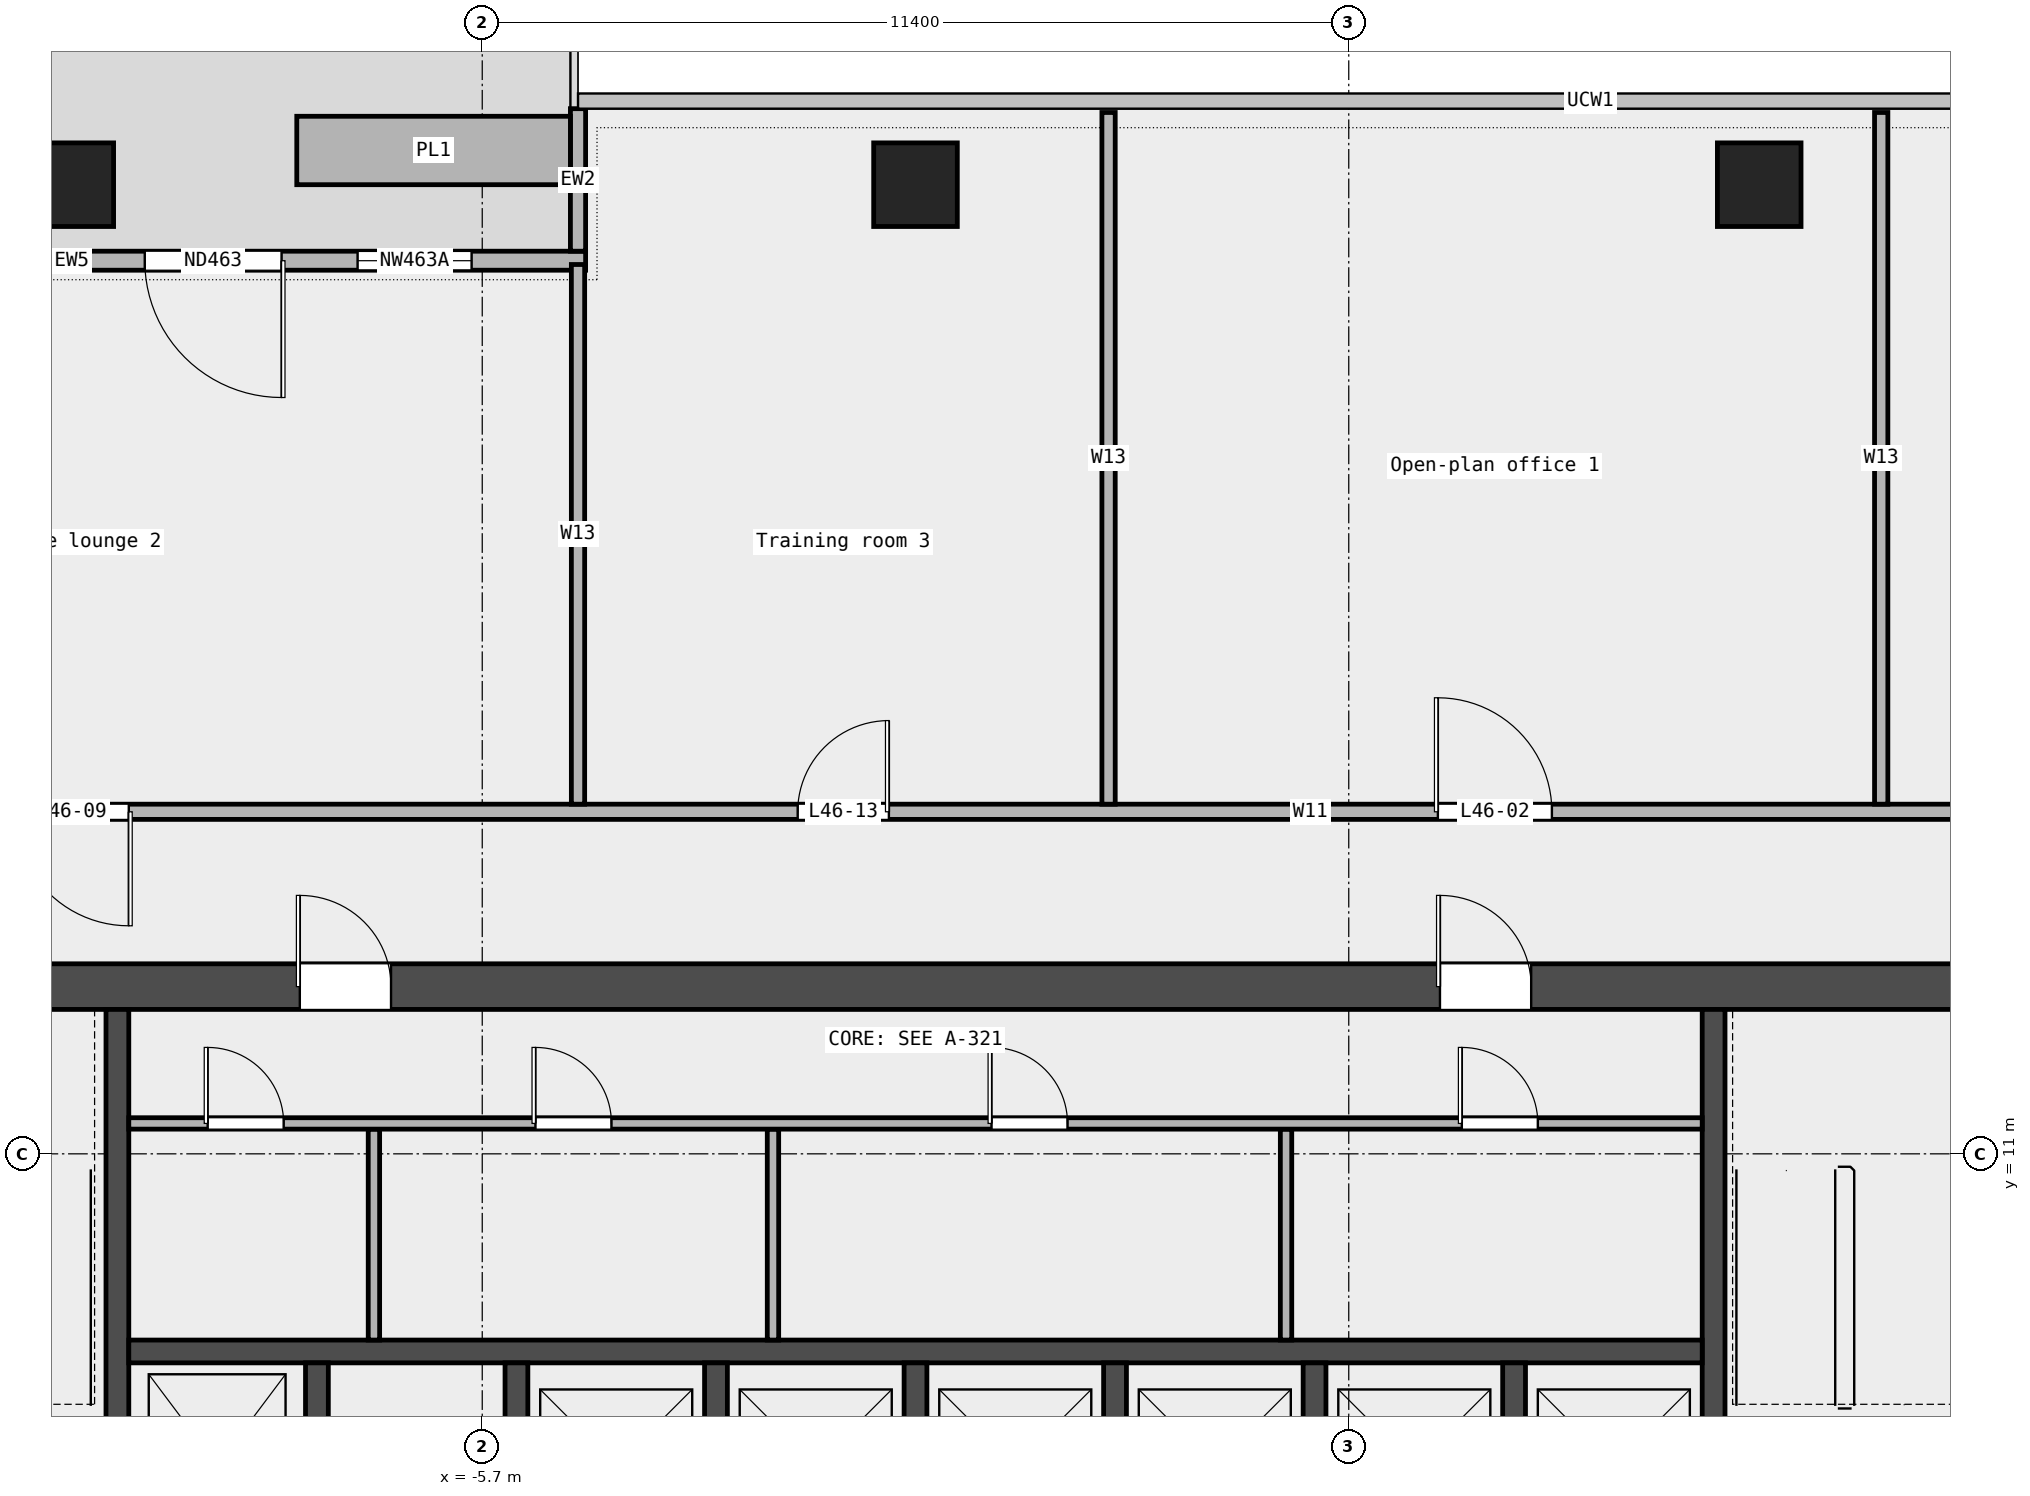
"""IFC4 building model, lengths in metres.
Left out: names, types, materials, properties, quantities, classifications, styles, units other than length and angle.
Written with IfcOpenShell. Run it as: python <this file> out.ifc"""

import sys

from ifc_helpers import new_model, si_unit, direction, frame, frame_2d, origin, origin_2d, place, context, subcontext, project, spatial, rectangle, extrude, element, fill, save


model = new_model("IFC4")
c1 = context("Model", 3, precision=1e-05, world=origin(), true_north=direction((0.0, 1.0)))
c2 = subcontext(c1, "Body", "Model", "MODEL_VIEW")
j1 = project(units=[si_unit("LENGTHUNIT", "METRE"), si_unit("PLANEANGLEUNIT", "RADIAN")], contexts=[c1])
p1 = place(None, origin())
s1 = spatial("IfcSite", under=j1, at=p1, CompositionType="ELEMENT")
p2 = place(p1, origin())
s2 = spatial("IfcBuilding", under=s1, at=p2, CompositionType="ELEMENT")
p3 = place(p2, frame((0.0, 0.0, 219.0)))
s3 = spatial("IfcBuildingStorey", under=s2, at=p3, CompositionType="ELEMENT", Elevation=219.0)
for number, where, z_axis, x_axis in (
    (1, (11.1, 23.75, 0.0), (0.0, 0.0, 1.0), (1.0, 0.0, 0.0)),
    (2, (0.0, 23.75, 0.0), (0.0, 0.0, 1.0), (1.0, 0.0, 0.0)),
    (3, (-11.1, 23.75, 0.0), (0.0, 0.0, 1.0), (1.0, 0.0, 0.0)),
):
    element("IfcColumn", number, at=place(p3, frame(where, z_axis=z_axis, x_axis=x_axis)), inside=s3, PredefinedType="COLUMN", context=c2, shape_type="SweptSolid", body=[
        extrude(rectangle(XDim=1.1, YDim=1.1, at=origin_2d()), origin(), (0.0, 0.0, 1.0), 3.6),
    ])
p4 = place(p3, frame((-4.34, 22.75, 0.0), z_axis=(0.0, 0.0, 1.0), x_axis=(-1.0, 0.0, 0.0)))
e4 = element("IfcWall", 4, at=p4, inside=s3, PredefinedType="STANDARD", context=c2, shape_type="SweptSolid", body=[
    extrude(rectangle(XDim=13.52, YDim=0.25, at=frame_2d((6.76, 0.0))), origin(), (0.0, 0.0, 1.0), 3.6),
])
p5 = place(p4, frame((1.5, 0.0, 0.45)))
e5 = element("IfcOpeningElement", 5, at=p5, cuts=e4, PredefinedType="OPENING", context=c2, shape_type="SweptSolid", body=[
    extrude(rectangle(XDim=1.5, YDim=2.4, at=frame_2d((0.75, 1.2))), frame((0.0, 0.137, 0.0), z_axis=(0.0, -1.0, 0.0), x_axis=(1.0, 0.0, 0.0)), (0.0, 0.0, 1.0), 0.274),
])
p6 = place(p4, frame((4.0, 0.0, 0.0)))
e6 = element("IfcOpeningElement", 6, at=p6, cuts=e4, PredefinedType="OPENING", context=c2, shape_type="SweptSolid", body=[
    extrude(rectangle(XDim=1.8, YDim=2.4, at=frame_2d((0.9, 1.2))), frame((0.0, 0.137, 0.0), z_axis=(0.0, -1.0, 0.0), x_axis=(1.0, 0.0, 0.0)), (0.0, 0.0, 1.0), 0.274),
])
p7 = place(p4, frame((10.5, 0.0, 0.45)))
e7 = element("IfcOpeningElement", 7, at=p7, cuts=e4, PredefinedType="OPENING", context=c2, shape_type="SweptSolid", body=[
    extrude(rectangle(XDim=1.5, YDim=2.4, at=frame_2d((0.75, 1.2))), frame((0.0, 0.137, 0.0), z_axis=(0.0, -1.0, 0.0), x_axis=(1.0, 0.0, 0.0)), (0.0, 0.0, 1.0), 0.274),
])
p8 = place(p3, frame((-4.44, 24.75, 0.0), z_axis=(0.0, 0.0, 1.0), x_axis=(0.0, -1.0, 0.0)))
e8 = element("IfcWall", 8, at=p8, inside=s3, PredefinedType="STANDARD", context=c2, shape_type="SweptSolid", body=[
    extrude(rectangle(XDim=1.875, YDim=0.2, at=frame_2d((0.938, 0.0))), origin(), (0.0, 0.0, 1.0), 3.6),
])
p9 = place(p3, frame((-4.54, 24.2, 0.0), z_axis=(0.0, 0.0, 1.0), x_axis=(-1.0, 0.0, 0.0)))
e9 = element("IfcWall", 9, at=p9, inside=s3, PredefinedType="STANDARD", context=c2, shape_type="SweptSolid", body=[
    extrude(rectangle(XDim=3.6, YDim=0.9, at=frame_2d((1.8, 0.0))), origin(), (0.0, 0.0, 1.0), 0.7),
])
p10 = place(p3, frame((-17.76, 15.5, 0.0), z_axis=(0.0, 0.0, 1.0), x_axis=(1.0, 0.0, 0.0)))
e10 = element("IfcWall", 10, at=p10, inside=s3, PredefinedType="PARTITIONING", context=c2, shape_type="SweptSolid", body=[
    extrude(rectangle(XDim=45.91, YDim=0.2, at=frame_2d((22.955, 0.0))), origin(), (0.0, 0.0, 1.0), 3.6),
])
p11 = place(p10, frame((37.337, 0.0, 0.0)))
e11 = element("IfcOpeningElement", 11, at=p11, cuts=e10, PredefinedType="OPENING", context=c2, shape_type="SweptSolid", body=[
    extrude(rectangle(XDim=1.5, YDim=2.1, at=frame_2d((0.75, 1.05))), frame((0.0, 0.112, 0.0), z_axis=(0.0, -1.0, 0.0), x_axis=(1.0, 0.0, 0.0)), (0.0, 0.0, 1.0), 0.224),
])
p12 = place(p10, frame((24.633, 0.0, 0.0)))
e12 = element("IfcOpeningElement", 12, at=p12, cuts=e10, PredefinedType="OPENING", context=c2, shape_type="SweptSolid", body=[
    extrude(rectangle(XDim=1.5, YDim=2.1, at=frame_2d((0.75, 1.05))), frame((0.0, 0.112, 0.0), z_axis=(0.0, -1.0, 0.0), x_axis=(1.0, 0.0, 0.0)), (0.0, 0.0, 1.0), 0.224),
])
p13 = place(p10, frame((5.91, 0.0, 0.0)))
e13 = element("IfcOpeningElement", 13, at=p13, cuts=e10, PredefinedType="OPENING", context=c2, shape_type="SweptSolid", body=[
    extrude(rectangle(XDim=1.5, YDim=2.1, at=frame_2d((0.75, 1.05))), frame((0.0, 0.112, 0.0), z_axis=(0.0, -1.0, 0.0), x_axis=(1.0, 0.0, 0.0)), (0.0, 0.0, 1.0), 0.224),
])
p14 = place(p10, frame((16.21, 0.0, 0.0)))
e14 = element("IfcOpeningElement", 14, at=p14, cuts=e10, PredefinedType="OPENING", context=c2, shape_type="SweptSolid", body=[
    extrude(rectangle(XDim=1.2, YDim=2.1, at=frame_2d((0.6, 1.05))), frame((0.0, 0.112, 0.0), z_axis=(0.0, -1.0, 0.0), x_axis=(1.0, 0.0, 0.0)), (0.0, 0.0, 1.0), 0.224),
])
p15 = place(p3, frame((-4.44, 15.6, 0.0), z_axis=(0.0, 0.0, 1.0), x_axis=(0.0, 1.0, 0.0)))
e15 = element("IfcWall", 15, at=p15, inside=s3, PredefinedType="PARTITIONING", context=c2, shape_type="SweptSolid", body=[
    extrude(rectangle(XDim=7.1, YDim=0.175, at=frame_2d((3.55, 0.0))), origin(), (0.0, 0.0, 1.0), 3.6),
])
for number, where, z_axis, x_axis in (
    (16, (2.54, 15.6, 0.0), (0.0, 0.0, 1.0), (0.0, 1.0, 0.0)),
    (17, (12.705, 15.6, 0.0), (0.0, 0.0, 1.0), (0.0, 1.0, 0.0)),
):
    element("IfcWall", number, at=place(p3, frame(where, z_axis=z_axis, x_axis=x_axis)), inside=s3, PredefinedType="PARTITIONING", context=c2, shape_type="SweptSolid", body=[
        extrude(rectangle(XDim=9.1, YDim=0.175, at=frame_2d((4.55, 0.0))), origin(), (0.0, 0.0, 1.0), 3.6),
    ])
p16 = place(p3, frame((-14.4, 13.2, 0.0), z_axis=(0.0, 0.0, 1.0), x_axis=(1.0, 0.0, 0.0)))
e18 = element("IfcWall", 18, at=p16, inside=s3, PredefinedType="SHEAR", context=c2, shape_type="SweptSolid", body=[
    extrude(rectangle(XDim=28.8, YDim=0.6, at=frame_2d((14.4, 0.0))), origin(), (0.0, 0.0, 1.0), 3.7),
])
p17 = place(p16, frame((6.3, 0.0, 0.0)))
e19 = element("IfcOpeningElement", 19, at=p17, cuts=e18, PredefinedType="OPENING", context=c2, shape_type="SweptSolid", body=[
    extrude(rectangle(XDim=1.2, YDim=2.1, at=frame_2d((0.6, 1.05))), frame((0.0, 0.312, 0.0), z_axis=(0.0, -1.0, 0.0), x_axis=(1.0, 0.0, 0.0)), (0.0, 0.0, 1.0), 0.624),
])
p18 = place(p16, frame((21.3, 0.0, 0.0)))
e20 = element("IfcOpeningElement", 20, at=p18, cuts=e18, PredefinedType="OPENING", context=c2, shape_type="SweptSolid", body=[
    extrude(rectangle(XDim=1.2, YDim=2.1, at=frame_2d((0.6, 1.05))), frame((0.0, 0.312, 0.0), z_axis=(0.0, -1.0, 0.0), x_axis=(1.0, 0.0, 0.0)), (0.0, 0.0, 1.0), 0.624),
])
for number, where, z_axis, x_axis in (
    (21, (-10.5, 5.25, 0.0), (0.0, 0.0, 1.0), (0.0, 1.0, 0.0)),
    (22, (10.5, 5.25, 0.0), (0.0, 0.0, 1.0), (0.0, 1.0, 0.0)),
):
    element("IfcWall", number, at=place(p3, frame(where, z_axis=z_axis, x_axis=x_axis)), inside=s3, PredefinedType="SHEAR", context=c2, shape_type="SweptSolid", body=[
        extrude(rectangle(XDim=7.65, YDim=0.3, at=frame_2d((3.825, 0.0))), origin(), (0.0, 0.0, 1.0), 3.7),
    ])
p19 = place(p3, frame((-10.35, 8.4, 0.0), z_axis=(0.0, 0.0, 1.0), x_axis=(1.0, 0.0, 0.0)))
e23 = element("IfcWall", 23, at=p19, inside=s3, PredefinedType="SOLIDWALL", context=c2, shape_type="SweptSolid", body=[
    extrude(rectangle(XDim=20.7, YDim=0.3, at=frame_2d((10.35, 0.0))), origin(), (0.0, 0.0, 1.0), 3.7),
])
for number, where, z_axis, x_axis in (
    (24, (-7.875, 5.55, 0.0), (0.0, 0.0, 1.0), (0.0, 1.0, 0.0)),
    (25, (-5.25, 5.55, 0.0), (0.0, 0.0, 1.0), (0.0, 1.0, 0.0)),
    (26, (-2.625, 5.55, 0.0), (0.0, 0.0, 1.0), (0.0, 1.0, 0.0)),
    (27, (0.0, 5.55, 0.0), (0.0, 0.0, 1.0), (0.0, 1.0, 0.0)),
    (28, (2.625, 5.55, 0.0), (0.0, 0.0, 1.0), (0.0, 1.0, 0.0)),
    (29, (5.25, 5.55, 0.0), (0.0, 0.0, 1.0), (0.0, 1.0, 0.0)),
    (30, (7.875, 5.55, 0.0), (0.0, 0.0, 1.0), (0.0, 1.0, 0.0)),
):
    element("IfcWall", number, at=place(p3, frame(where, z_axis=z_axis, x_axis=x_axis)), inside=s3, PredefinedType="SOLIDWALL", context=c2, shape_type="SweptSolid", body=[
        extrude(rectangle(XDim=2.7, YDim=0.3, at=frame_2d((1.35, 0.0))), origin(), (0.0, 0.0, 1.0), 3.7),
    ])
for number, where, z_axis, x_axis in (
    (31, (-7.125, 8.55, 0.0), (0.0, 0.0, 1.0), (0.0, 1.0, 0.0)),
    (32, (-1.875, 8.55, 0.0), (0.0, 0.0, 1.0), (0.0, 1.0, 0.0)),
    (33, (4.875, 8.55, 0.0), (0.0, 0.0, 1.0), (0.0, 1.0, 0.0)),
):
    element("IfcWall", number, at=place(p3, frame(where, z_axis=z_axis, x_axis=x_axis)), inside=s3, PredefinedType="PARTITIONING", context=c2, shape_type="SweptSolid", body=[
        extrude(rectangle(XDim=2.775, YDim=0.15, at=frame_2d((1.387, 0.0))), origin(), (0.0, 0.0, 1.0), 3.7),
    ])
p20 = place(p3, frame((-10.35, 11.4, 0.0), z_axis=(0.0, 0.0, 1.0), x_axis=(1.0, 0.0, 0.0)))
e34 = element("IfcWall", 34, at=p20, inside=s3, PredefinedType="PARTITIONING", context=c2, shape_type="SweptSolid", body=[
    extrude(rectangle(XDim=20.7, YDim=0.15, at=frame_2d((10.35, 0.0))), origin(), (0.0, 0.0, 1.0), 3.7),
])
p21 = place(p20, frame((1.038, 0.0, 0.0)))
e35 = element("IfcOpeningElement", 35, at=p21, cuts=e34, PredefinedType="OPENING", context=c2, shape_type="SweptSolid", body=[
    extrude(rectangle(XDim=1.0, YDim=2.1, at=frame_2d((0.5, 1.05))), frame((0.0, 0.087, 0.0), z_axis=(0.0, -1.0, 0.0), x_axis=(1.0, 0.0, 0.0)), (0.0, 0.0, 1.0), 0.174),
])
p22 = place(p20, frame((5.35, 0.0, 0.0)))
e36 = element("IfcOpeningElement", 36, at=p22, cuts=e34, PredefinedType="OPENING", context=c2, shape_type="SweptSolid", body=[
    extrude(rectangle(XDim=1.0, YDim=2.1, at=frame_2d((0.5, 1.05))), frame((0.0, 0.087, 0.0), z_axis=(0.0, -1.0, 0.0), x_axis=(1.0, 0.0, 0.0)), (0.0, 0.0, 1.0), 0.174),
])
p23 = place(p20, frame((11.35, 0.0, 0.0)))
e37 = element("IfcOpeningElement", 37, at=p23, cuts=e34, PredefinedType="OPENING", context=c2, shape_type="SweptSolid", body=[
    extrude(rectangle(XDim=1.0, YDim=2.1, at=frame_2d((0.5, 1.05))), frame((0.0, 0.087, 0.0), z_axis=(0.0, -1.0, 0.0), x_axis=(1.0, 0.0, 0.0)), (0.0, 0.0, 1.0), 0.174),
])
p24 = place(p20, frame((17.538, 0.0, 0.0)))
e38 = element("IfcOpeningElement", 38, at=p24, cuts=e34, PredefinedType="OPENING", context=c2, shape_type="SweptSolid", body=[
    extrude(rectangle(XDim=1.0, YDim=2.1, at=frame_2d((0.5, 1.05))), frame((0.0, 0.087, 0.0), z_axis=(0.0, -1.0, 0.0), x_axis=(1.0, 0.0, 0.0)), (0.0, 0.0, 1.0), 0.174),
])
p25 = place(p5, origin())
e39 = element("IfcWindow", 39, at=p25, inside=s3, PartitioningType="SINGLE_PANEL", PredefinedType="WINDOW", context=c2, shape_type="SweptSolid", body=[
    extrude(rectangle(XDim=1.5, YDim=2.4, at=frame_2d((0.75, 1.2))), frame((0.0, 0.03, 0.0), z_axis=(0.0, -1.0, 0.0), x_axis=(1.0, 0.0, 0.0)), (0.0, 0.0, 1.0), 0.06),
])
fill(e5, e39)
p26 = place(p6, origin())
e40 = element("IfcDoor", 40, at=p26, inside=s3, OperationType="DOUBLE_DOOR_SINGLE_SWING", PredefinedType="DOOR", context=c2, shape_type="SweptSolid", body=[
    extrude(rectangle(XDim=1.8, YDim=2.4, at=frame_2d((0.9, 1.2))), frame((0.0, 0.025, 0.0), z_axis=(0.0, -1.0, 0.0), x_axis=(1.0, 0.0, 0.0)), (0.0, 0.0, 1.0), 0.05),
])
fill(e6, e40)
p27 = place(p12, origin())
e41 = element("IfcDoor", 41, at=p27, inside=s3, OperationType="DOUBLE_DOOR_SINGLE_SWING", PredefinedType="DOOR", context=c2, shape_type="SweptSolid", body=[
    extrude(rectangle(XDim=1.5, YDim=2.1, at=frame_2d((0.75, 1.05))), frame((0.0, 0.025, 0.0), z_axis=(0.0, -1.0, 0.0), x_axis=(1.0, 0.0, 0.0)), (0.0, 0.0, 1.0), 0.05),
])
fill(e12, e41)
p28 = place(p13, origin())
e42 = element("IfcDoor", 42, at=p28, inside=s3, OperationType="DOUBLE_DOOR_SINGLE_SWING", PredefinedType="DOOR", context=c2, shape_type="SweptSolid", body=[
    extrude(rectangle(XDim=1.5, YDim=2.1, at=frame_2d((0.75, 1.05))), frame((0.0, 0.025, 0.0), z_axis=(0.0, -1.0, 0.0), x_axis=(1.0, 0.0, 0.0)), (0.0, 0.0, 1.0), 0.05),
])
fill(e13, e42)
p29 = place(p14, origin())
e43 = element("IfcDoor", 43, at=p29, inside=s3, OperationType="SINGLE_SWING_RIGHT", PredefinedType="DOOR", context=c2, shape_type="SweptSolid", body=[
    extrude(rectangle(XDim=1.2, YDim=2.1, at=frame_2d((0.6, 1.05))), frame((0.0, 0.025, 0.0), z_axis=(0.0, -1.0, 0.0), x_axis=(1.0, 0.0, 0.0)), (0.0, 0.0, 1.0), 0.05),
])
fill(e14, e43)
p30 = place(p21, origin())
e44 = element("IfcDoor", 44, at=p30, inside=s3, OperationType="SINGLE_SWING_LEFT", PredefinedType="DOOR", context=c2, shape_type="SweptSolid", body=[
    extrude(rectangle(XDim=1.0, YDim=2.1, at=frame_2d((0.5, 1.05))), frame((0.0, 0.025, 0.0), z_axis=(0.0, -1.0, 0.0), x_axis=(1.0, 0.0, 0.0)), (0.0, 0.0, 1.0), 0.05),
])
fill(e35, e44)
p31 = place(p22, origin())
e45 = element("IfcDoor", 45, at=p31, inside=s3, OperationType="SINGLE_SWING_LEFT", PredefinedType="DOOR", context=c2, shape_type="SweptSolid", body=[
    extrude(rectangle(XDim=1.0, YDim=2.1, at=frame_2d((0.5, 1.05))), frame((0.0, 0.025, 0.0), z_axis=(0.0, -1.0, 0.0), x_axis=(1.0, 0.0, 0.0)), (0.0, 0.0, 1.0), 0.05),
])
fill(e36, e45)
p32 = place(p23, origin())
e46 = element("IfcDoor", 46, at=p32, inside=s3, OperationType="SINGLE_SWING_LEFT", PredefinedType="DOOR", context=c2, shape_type="SweptSolid", body=[
    extrude(rectangle(XDim=1.0, YDim=2.1, at=frame_2d((0.5, 1.05))), frame((0.0, 0.025, 0.0), z_axis=(0.0, -1.0, 0.0), x_axis=(1.0, 0.0, 0.0)), (0.0, 0.0, 1.0), 0.05),
])
fill(e37, e46)
p33 = place(p24, origin())
e47 = element("IfcDoor", 47, at=p33, inside=s3, OperationType="SINGLE_SWING_LEFT", PredefinedType="DOOR", context=c2, shape_type="SweptSolid", body=[
    extrude(rectangle(XDim=1.0, YDim=2.1, at=frame_2d((0.5, 1.05))), frame((0.0, 0.025, 0.0), z_axis=(0.0, -1.0, 0.0), x_axis=(1.0, 0.0, 0.0)), (0.0, 0.0, 1.0), 0.05),
])
fill(e38, e47)
p34 = place(p17, origin())
e48 = element("IfcDoor", 48, at=p34, inside=s3, OperationType="SINGLE_SWING_LEFT", PredefinedType="DOOR", context=c2, shape_type="SweptSolid", body=[
    extrude(rectangle(XDim=1.2, YDim=2.1, at=frame_2d((0.6, 1.05))), frame((0.0, 0.025, 0.0), z_axis=(0.0, -1.0, 0.0), x_axis=(1.0, 0.0, 0.0)), (0.0, 0.0, 1.0), 0.05),
])
fill(e19, e48)
p35 = place(p18, origin())
e49 = element("IfcDoor", 49, at=p35, inside=s3, OperationType="SINGLE_SWING_RIGHT", PredefinedType="DOOR", context=c2, shape_type="SweptSolid", body=[
    extrude(rectangle(XDim=1.2, YDim=2.1, at=frame_2d((0.6, 1.05))), frame((0.0, 0.025, 0.0), z_axis=(0.0, -1.0, 0.0), x_axis=(1.0, 0.0, 0.0)), (0.0, 0.0, 1.0), 0.05),
])
fill(e20, e49)
save(model, sys.argv[1])
